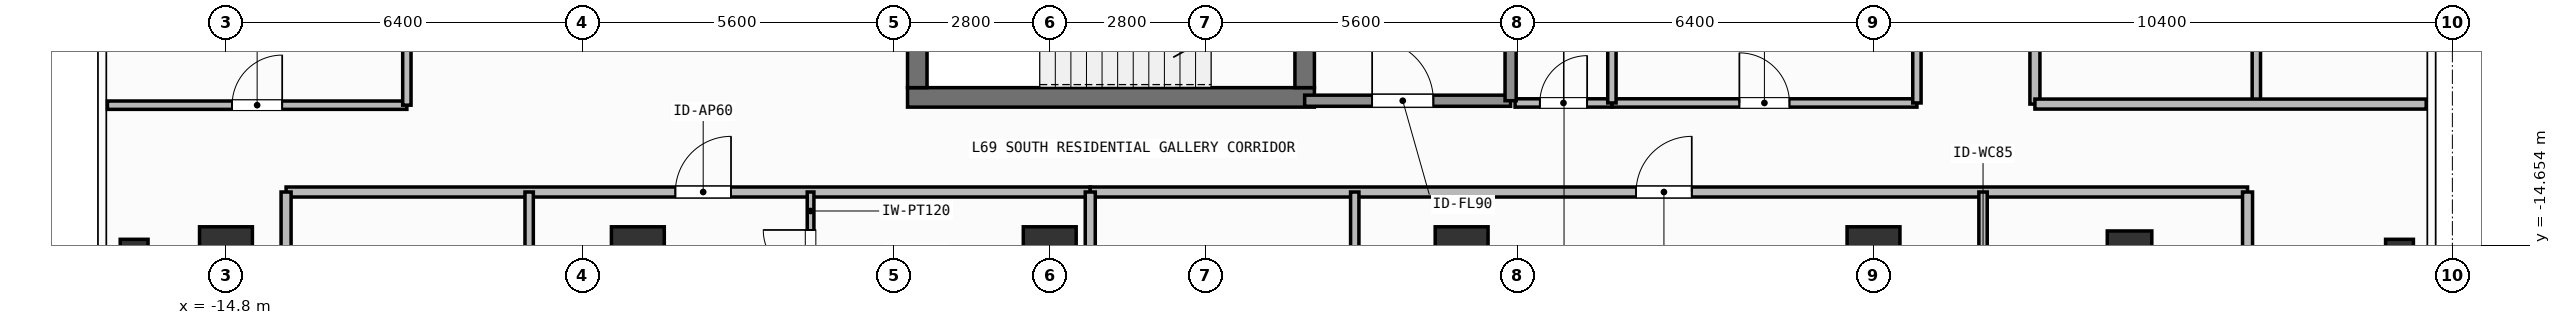
"""IFC4 building model, lengths in metres.
Left out: names, types, materials, properties, quantities, classifications, styles, units other than length and angle.
Written with IfcOpenShell. Run it as: python <this file> out.ifc"""

import sys

from ifc_helpers import new_model, si_unit, direction, frame, frame_2d, origin, origin_2d, place, context, subcontext, project, spatial, rectangle, hollow_rectangle, extrude, element, fill, save


model = new_model("IFC4")
c1 = context("Model", 3, precision=1e-05, world=origin(), true_north=direction((0.0, 1.0)))
c2 = subcontext(c1, "Body", "Model", "MODEL_VIEW")
j1 = project(units=[si_unit("LENGTHUNIT", "METRE"), si_unit("PLANEANGLEUNIT", "RADIAN")], contexts=[c1])
p1 = place(None, origin())
s1 = spatial("IfcSite", under=j1, at=p1, CompositionType="ELEMENT")
p2 = place(p1, origin())
s2 = spatial("IfcBuilding", under=s1, at=p2, CompositionType="ELEMENT")
p3 = place(p2, frame((0.0, 0.0, 282.0)))
s3 = spatial("IfcBuildingStorey", under=s2, at=p3, CompositionType="ELEMENT", Elevation=282.0)
p4 = place(p3, frame((-2.555, -12.0, 0.0), z_axis=(0.0, 0.0, 1.0), x_axis=(1.0, 0.0, 0.0)))
e1 = element("IfcWall", 1, at=p4, inside=s3, PredefinedType="SHEAR", context=c2, shape_type="SweptSolid", body=[
    extrude(rectangle(XDim=7.31, YDim=0.35, at=frame_2d((3.655, 0.0))), origin(), (0.0, 0.0, 1.0), 3.9),
])
p5 = place(p3, frame((-2.38, -11.825, 0.0), z_axis=(0.0, 0.0, 1.0), x_axis=(0.0, 1.0, 0.0)))
e2 = element("IfcWall", 2, at=p5, inside=s3, PredefinedType="SHEAR", context=c2, shape_type="SweptSolid", body=[
    extrude(rectangle(XDim=2.925, YDim=0.35, at=frame_2d((1.462, 0.0))), origin(), (0.0, 0.0, 1.0), 3.9),
])
p6 = place(p3, frame((4.58, -8.9, 0.0), z_axis=(0.0, 0.0, 1.0), x_axis=(0.0, -1.0, 0.0)))
e3 = element("IfcWall", 3, at=p6, inside=s3, PredefinedType="SHEAR", context=c2, shape_type="SweptSolid", body=[
    extrude(rectangle(XDim=2.925, YDim=0.35, at=frame_2d((1.462, 0.0))), origin(), (0.0, 0.0, 1.0), 3.9),
])
p7 = place(p6, frame((0.913, 0.0, 0.0)))
e4 = element("IfcOpeningElement", 4, at=p7, cuts=e3, PredefinedType="OPENING", context=c2, shape_type="SweptSolid", body=[
    extrude(rectangle(XDim=1.1, YDim=2.15, at=frame_2d((0.55, 1.075))), frame((0.0, 0.185, 0.0), z_axis=(0.0, -1.0, 0.0), x_axis=(1.0, 0.0, 0.0)), (0.0, 0.0, 1.0), 0.37),
])
for number, where, z_axis, x_axis in (
    (5, (-14.8, -14.8, 0.0), (0.0, 0.0, 1.0), (1.0, 0.0, 0.0)),
    (6, (-7.4, -14.8, 0.0), (0.0, 0.0, 1.0), (1.0, 0.0, 0.0)),
    (7, (0.0, -14.8, 0.0), (0.0, 0.0, 1.0), (1.0, 0.0, 0.0)),
    (8, (7.4, -14.8, 0.0), (0.0, 0.0, 1.0), (1.0, 0.0, 0.0)),
    (9, (14.8, -14.8, 0.0), (0.0, 0.0, 1.0), (1.0, 0.0, 0.0)),
):
    element("IfcColumn", number, at=place(p3, frame(where, z_axis=z_axis, x_axis=x_axis)), inside=s3, PredefinedType="COLUMN", context=c2, shape_type="SweptSolid", body=[
        extrude(rectangle(XDim=0.95, YDim=0.95, at=origin_2d()), origin(), (0.0, 0.0, 1.0), 3.9),
    ])
p8 = place(p3, frame((19.4, -14.8, 0.0), z_axis=(0.0, 0.0, 1.0), x_axis=(1.0, 0.0, 0.0)))
e10 = element("IfcColumn", 10, at=p8, inside=s3, PredefinedType="COLUMN", context=c2, shape_type="SweptSolid", body=[
    extrude(hollow_rectangle(XDim=0.8, YDim=0.8, WallThickness=0.036, at=origin_2d()), origin(), (0.0, 0.0, 1.0), 3.9),
])
for number, where, z_axis, x_axis in (
    (11, (-16.45, -14.8, 0.0), (0.0, 0.0, 1.0), (1.0, 0.0, 0.0)),
    (12, (24.25, -14.8, 0.0), (0.0, 0.0, 1.0), (1.0, 0.0, 0.0)),
):
    element("IfcColumn", number, at=place(p3, frame(where, z_axis=z_axis, x_axis=x_axis)), inside=s3, PredefinedType="COLUMN", context=c2, shape_type="SweptSolid", body=[
        extrude(hollow_rectangle(XDim=0.5, YDim=0.5, WallThickness=0.025, at=origin_2d()), origin(), (0.0, 0.0, 1.0), 3.9),
    ])
p9 = place(p3, frame((4.58, -12.06, 0.0), z_axis=(0.0, 0.0, 1.0), x_axis=(1.0, 0.0, 0.0)))
e13 = element("IfcWall", 13, at=p9, inside=s3, PredefinedType="SOLIDWALL", context=c2, shape_type="SweptSolid", body=[
    extrude(rectangle(XDim=3.7, YDim=0.2, at=frame_2d((1.85, 0.0))), origin(), (0.0, 0.0, 1.0), 3.62),
])
p10 = place(p9, frame((1.212, 0.0, 0.0)))
e14 = element("IfcOpeningElement", 14, at=p10, cuts=e13, PredefinedType="OPENING", context=c2, shape_type="SweptSolid", body=[
    extrude(rectangle(XDim=1.1, YDim=2.15, at=frame_2d((0.55, 1.075))), frame((0.0, 0.11, 0.0), z_axis=(0.0, -1.0, 0.0), x_axis=(1.0, 0.0, 0.0)), (0.0, 0.0, 1.0), 0.22),
])
p11 = place(p3, frame((8.36, -12.1, 0.0), z_axis=(0.0, 0.0, 1.0), x_axis=(1.0, 0.0, 0.0)))
e15 = element("IfcWall", 15, at=p11, inside=s3, PredefinedType="PARTITIONING", context=c2, shape_type="SweptSolid", body=[
    extrude(rectangle(XDim=1.74, YDim=0.15, at=frame_2d((0.87, 0.0))), origin(), (0.0, 0.0, 1.0), 3.62),
])
p12 = place(p11, frame((0.445, 0.0, 0.0)))
e16 = element("IfcOpeningElement", 16, at=p12, cuts=e15, PredefinedType="OPENING", context=c2, shape_type="SweptSolid", body=[
    extrude(rectangle(XDim=0.85, YDim=2.1, at=frame_2d((0.425, 1.05))), frame((0.0, 0.085, 0.0), z_axis=(0.0, -1.0, 0.0), x_axis=(1.0, 0.0, 0.0)), (0.0, 0.0, 1.0), 0.17),
])
p13 = place(p3, frame((10.1, -12.1, 0.0), z_axis=(0.0, 0.0, 1.0), x_axis=(1.0, 0.0, 0.0)))
e17 = element("IfcWall", 17, at=p13, inside=s3, PredefinedType="PARTITIONING", context=c2, shape_type="SweptSolid", body=[
    extrude(rectangle(XDim=5.48, YDim=0.15, at=frame_2d((2.74, 0.0))), origin(), (0.0, 0.0, 1.0), 3.62),
])
p14 = place(p13, frame((2.29, 0.0, 0.0)))
e18 = element("IfcOpeningElement", 18, at=p14, cuts=e17, PredefinedType="OPENING", context=c2, shape_type="SweptSolid", body=[
    extrude(rectangle(XDim=0.9, YDim=2.1, at=frame_2d((0.45, 1.05))), frame((0.0, 0.085, 0.0), z_axis=(0.0, -1.0, 0.0), x_axis=(1.0, 0.0, 0.0)), (0.0, 0.0, 1.0), 0.17),
])
p15 = place(p3, frame((-13.72, -13.7, 0.0), z_axis=(0.0, 0.0, 1.0), x_axis=(1.0, 0.0, 0.0)))
e19 = element("IfcWall", 19, at=p15, inside=s3, PredefinedType="PARTITIONING", context=c2, shape_type="SweptSolid", body=[
    extrude(rectangle(XDim=14.448, YDim=0.18, at=frame_2d((7.224, 0.0))), origin(), (0.0, 0.0, 1.0), 3.62),
])
p16 = place(p15, frame((6.994, 0.0, 0.0)))
e20 = element("IfcOpeningElement", 20, at=p16, cuts=e19, PredefinedType="OPENING", context=c2, shape_type="SweptSolid", body=[
    extrude(rectangle(XDim=1.0, YDim=2.2, at=frame_2d((0.5, 1.1))), frame((0.0, 0.1, 0.0), z_axis=(0.0, -1.0, 0.0), x_axis=(1.0, 0.0, 0.0)), (0.0, 0.0, 1.0), 0.2),
])
p17 = place(p3, frame((-9.353, -17.343, 0.0), z_axis=(0.0, 0.0, 1.0), x_axis=(0.0, 1.0, 0.0)))
e21 = element("IfcWall", 21, at=p17, inside=s3, PredefinedType="PARTITIONING", context=c2, shape_type="SweptSolid", body=[
    extrude(rectangle(XDim=3.643, YDim=0.15, at=frame_2d((1.822, 0.0))), origin(), (0.0, 0.0, 1.0), 3.62),
])
p18 = place(p17, frame((1.396, 0.0, 0.0)))
e22 = element("IfcOpeningElement", 22, at=p18, cuts=e21, PredefinedType="OPENING", context=c2, shape_type="SweptSolid", body=[
    extrude(rectangle(XDim=0.85, YDim=2.1, at=frame_2d((0.425, 1.05))), frame((0.0, 0.085, 0.0), z_axis=(0.0, -1.0, 0.0), x_axis=(1.0, 0.0, 0.0)), (0.0, 0.0, 1.0), 0.17),
])
p19 = place(p3, frame((-4.297, -15.74, 0.0), z_axis=(0.0, 0.0, 1.0), x_axis=(0.0, 1.0, 0.0)))
e23 = element("IfcWall", 23, at=p19, inside=s3, PredefinedType="PARTITIONING", context=c2, shape_type="SweptSolid", body=[
    extrude(rectangle(XDim=2.04, YDim=0.12, at=frame_2d((1.02, 0.0))), origin(), (0.0, 0.0, 1.0), 3.62),
])
p20 = place(p19, frame((0.508, 0.0, 0.0)))
e24 = element("IfcOpeningElement", 24, at=p20, cuts=e23, PredefinedType="OPENING", context=c2, shape_type="SweptSolid", body=[
    extrude(rectangle(XDim=0.85, YDim=2.1, at=frame_2d((0.425, 1.05))), frame((0.0, 0.07, 0.0), z_axis=(0.0, -1.0, 0.0), x_axis=(1.0, 0.0, 0.0)), (0.0, 0.0, 1.0), 0.14),
])
p21 = place(p3, frame((0.728, -13.7, 0.0), z_axis=(0.0, 0.0, 1.0), x_axis=(1.0, 0.0, 0.0)))
e25 = element("IfcWall", 25, at=p21, inside=s3, PredefinedType="PARTITIONING", context=c2, shape_type="SweptSolid", body=[
    extrude(rectangle(XDim=20.792, YDim=0.18, at=frame_2d((10.396, 0.0))), origin(), (0.0, 0.0, 1.0), 3.62),
])
p22 = place(p21, frame((9.807, 0.0, 0.0)))
e26 = element("IfcOpeningElement", 26, at=p22, cuts=e25, PredefinedType="OPENING", context=c2, shape_type="SweptSolid", body=[
    extrude(rectangle(XDim=1.0, YDim=2.2, at=frame_2d((0.5, 1.1))), frame((0.0, 0.1, 0.0), z_axis=(0.0, -1.0, 0.0), x_axis=(1.0, 0.0, 0.0)), (0.0, 0.0, 1.0), 0.2),
])
p23 = place(p3, frame((5.48, -17.045, 0.0), z_axis=(0.0, 0.0, 1.0), x_axis=(0.0, 1.0, 0.0)))
e27 = element("IfcWall", 27, at=p23, inside=s3, PredefinedType="PARTITIONING", context=c2, shape_type="SweptSolid", body=[
    extrude(rectangle(XDim=3.345, YDim=0.15, at=frame_2d((1.672, 0.0))), origin(), (0.0, 0.0, 1.0), 3.62),
])
p24 = place(p23, frame((1.164, 0.0, 0.0)))
e28 = element("IfcOpeningElement", 28, at=p24, cuts=e27, PredefinedType="OPENING", context=c2, shape_type="SweptSolid", body=[
    extrude(rectangle(XDim=0.85, YDim=2.1, at=frame_2d((0.425, 1.05))), frame((0.0, 0.085, 0.0), z_axis=(0.0, -1.0, 0.0), x_axis=(1.0, 0.0, 0.0)), (0.0, 0.0, 1.0), 0.17),
])
p25 = place(p3, frame((16.768, -17.045, 0.0), z_axis=(0.0, 0.0, 1.0), x_axis=(0.0, 1.0, 0.0)))
e29 = element("IfcWall", 29, at=p25, inside=s3, PredefinedType="PARTITIONING", context=c2, shape_type="SweptSolid", body=[
    extrude(rectangle(XDim=3.345, YDim=0.15, at=frame_2d((1.672, 0.0))), origin(), (0.0, 0.0, 1.0), 3.62),
])
p26 = place(p25, frame((1.164, 0.0, 0.0)))
e30 = element("IfcOpeningElement", 30, at=p26, cuts=e29, PredefinedType="OPENING", context=c2, shape_type="SweptSolid", body=[
    extrude(rectangle(XDim=0.85, YDim=2.1, at=frame_2d((0.425, 1.05))), frame((0.0, 0.085, 0.0), z_axis=(0.0, -1.0, 0.0), x_axis=(1.0, 0.0, 0.0)), (0.0, 0.0, 1.0), 0.17),
])
p27 = place(p3, frame((-16.93, -12.14, 0.0), z_axis=(0.0, 0.0, 1.0), x_axis=(1.0, 0.0, 0.0)))
e31 = element("IfcWall", 31, at=p27, inside=s3, PredefinedType="PARTITIONING", context=c2, shape_type="SweptSolid", body=[
    extrude(rectangle(XDim=5.38, YDim=0.15, at=frame_2d((2.69, 0.0))), origin(), (0.0, 0.0, 1.0), 3.62),
])
p28 = place(p27, frame((2.24, 0.0, 0.0)))
e32 = element("IfcOpeningElement", 32, at=p28, cuts=e31, PredefinedType="OPENING", context=c2, shape_type="SweptSolid", body=[
    extrude(rectangle(XDim=0.9, YDim=2.1, at=frame_2d((0.45, 1.05))), frame((0.0, 0.085, 0.0), z_axis=(0.0, -1.0, 0.0), x_axis=(1.0, 0.0, 0.0)), (0.0, 0.0, 1.0), 0.17),
])
p29 = place(p3, frame((17.7, -12.12, 0.0), z_axis=(0.0, 0.0, 1.0), x_axis=(0.0, 1.0, 0.0)))
e33 = element("IfcWall", 33, at=p29, inside=s3, PredefinedType="PARTITIONING", context=c2, shape_type="SweptSolid", body=[
    extrude(rectangle(XDim=24.24, YDim=0.18, at=frame_2d((12.12, 0.0))), origin(), (0.0, 0.0, 1.0), 3.62),
])
p30 = place(p29, frame((11.62, 0.0, 0.0)))
e34 = element("IfcOpeningElement", 34, at=p30, cuts=e33, PredefinedType="OPENING", context=c2, shape_type="SweptSolid", body=[
    extrude(rectangle(XDim=1.0, YDim=2.2, at=frame_2d((0.5, 1.1))), frame((0.0, 0.1, 0.0), z_axis=(0.0, -1.0, 0.0), x_axis=(1.0, 0.0, 0.0)), (0.0, 0.0, 1.0), 0.2),
])
p31 = place(p3, frame((8.28, -12.06, 0.0), z_axis=(0.0, 0.0, 1.0), x_axis=(0.0, 1.0, 0.0)))
e35 = element("IfcWall", 35, at=p31, inside=s3, PredefinedType="SOLIDWALL", context=c2, shape_type="SweptSolid", body=[
    extrude(rectangle(XDim=3.335, YDim=0.2, at=frame_2d((1.667, 0.0))), origin(), (0.0, 0.0, 1.0), 3.62),
])
p32 = place(p3, frame((10.1, -12.1, 0.0), z_axis=(0.0, 0.0, 1.0), x_axis=(0.0, 1.0, 0.0)))
e36 = element("IfcWall", 36, at=p32, inside=s3, PredefinedType="PARTITIONING", context=c2, shape_type="SweptSolid", body=[
    extrude(rectangle(XDim=2.35, YDim=0.15, at=frame_2d((1.175, 0.0))), origin(), (0.0, 0.0, 1.0), 3.62),
])
p33 = place(p3, frame((15.58, -12.1, 0.0), z_axis=(0.0, 0.0, 1.0), x_axis=(0.0, 1.0, 0.0)))
e37 = element("IfcWall", 37, at=p33, inside=s3, PredefinedType="PARTITIONING", context=c2, shape_type="SweptSolid", body=[
    extrude(rectangle(XDim=6.25, YDim=0.15, at=frame_2d((3.125, 0.0))), origin(), (0.0, 0.0, 1.0), 3.62),
])
for number, where, z_axis, x_axis in (
    (38, (-13.72, -19.51, 0.0), (0.0, 0.0, 1.0), (0.0, 1.0, 0.0)),
    (39, (21.52, -19.51, 0.0), (0.0, 0.0, 1.0), (0.0, 1.0, 0.0)),
):
    element("IfcWall", number, at=place(p3, frame(where, z_axis=z_axis, x_axis=x_axis)), inside=s3, PredefinedType="PARTITIONING", context=c2, shape_type="SweptSolid", body=[
        extrude(rectangle(XDim=5.81, YDim=0.18, at=frame_2d((2.905, 0.0))), origin(), (0.0, 0.0, 1.0), 3.62),
    ])
p34 = place(p3, frame((0.728, -20.63, 0.0), z_axis=(0.0, 0.0, 1.0), x_axis=(0.0, 1.0, 0.0)))
e40 = element("IfcWall", 40, at=p34, inside=s3, PredefinedType="PARTITIONING", context=c2, shape_type="SweptSolid", body=[
    extrude(rectangle(XDim=6.93, YDim=0.18, at=frame_2d((3.465, 0.0))), origin(), (0.0, 0.0, 1.0), 3.62),
])
p35 = place(p3, frame((-11.55, -12.14, 0.0), z_axis=(0.0, 0.0, 1.0), x_axis=(0.0, 1.0, 0.0)))
e41 = element("IfcWall", 41, at=p35, inside=s3, PredefinedType="PARTITIONING", context=c2, shape_type="SweptSolid", body=[
    extrude(rectangle(XDim=13.94, YDim=0.15, at=frame_2d((6.97, 0.0))), origin(), (0.0, 0.0, 1.0), 3.62),
])
p36 = place(p3, frame((21.678, -12.12, 0.0), z_axis=(0.0, 0.0, 1.0), x_axis=(0.0, 1.0, 0.0)))
e42 = element("IfcWall", 42, at=p36, inside=s3, PredefinedType="PARTITIONING", context=c2, shape_type="SweptSolid", body=[
    extrude(rectangle(XDim=6.689, YDim=0.15, at=frame_2d((3.345, 0.0))), origin(), (0.0, 0.0, 1.0), 3.62),
])
p37 = place(p3, frame((17.7, -12.12, 0.0), z_axis=(0.0, 0.0, 1.0), x_axis=(1.0, 0.0, 0.0)))
e43 = element("IfcWall", 43, at=p37, inside=s3, PredefinedType="PARTITIONING", context=c2, shape_type="SweptSolid", body=[
    extrude(rectangle(XDim=7.03, YDim=0.18, at=frame_2d((3.515, 0.0))), origin(), (0.0, 0.0, 1.0), 3.62),
])
p38 = place(p10, origin())
e44 = element("IfcDoor", 44, at=p38, inside=s3, OperationType="SINGLE_SWING_LEFT", PredefinedType="DOOR", context=c2, shape_type="SweptSolid", body=[
    extrude(rectangle(XDim=1.1, YDim=2.15, at=frame_2d((0.55, 1.075))), frame((0.0, 0.025, 0.0), z_axis=(0.0, -1.0, 0.0), x_axis=(1.0, 0.0, 0.0)), (0.0, 0.0, 1.0), 0.05),
])
fill(e14, e44)
p39 = place(p12, origin())
e45 = element("IfcDoor", 45, at=p39, inside=s3, OperationType="SINGLE_SWING_RIGHT", PredefinedType="DOOR", context=c2, shape_type="SweptSolid", body=[
    extrude(rectangle(XDim=0.85, YDim=2.1, at=frame_2d((0.425, 1.05))), frame((0.0, 0.025, 0.0), z_axis=(0.0, -1.0, 0.0), x_axis=(1.0, 0.0, 0.0)), (0.0, 0.0, 1.0), 0.05),
])
fill(e16, e45)
p40 = place(p14, origin())
e46 = element("IfcDoor", 46, at=p40, inside=s3, OperationType="SINGLE_SWING_LEFT", PredefinedType="DOOR", context=c2, shape_type="SweptSolid", body=[
    extrude(rectangle(XDim=0.9, YDim=2.1, at=frame_2d((0.45, 1.05))), frame((0.0, 0.025, 0.0), z_axis=(0.0, -1.0, 0.0), x_axis=(1.0, 0.0, 0.0)), (0.0, 0.0, 1.0), 0.05),
])
fill(e18, e46)
p41 = place(p16, origin())
e47 = element("IfcDoor", 47, at=p41, inside=s3, OperationType="SINGLE_SWING_RIGHT", PredefinedType="DOOR", context=c2, shape_type="SweptSolid", body=[
    extrude(rectangle(XDim=1.0, YDim=2.2, at=frame_2d((0.5, 1.1))), frame((0.0, 0.025, 0.0), z_axis=(0.0, -1.0, 0.0), x_axis=(1.0, 0.0, 0.0)), (0.0, 0.0, 1.0), 0.05),
])
fill(e20, e47)
p42 = place(p20, origin())
e48 = element("IfcDoor", 48, at=p42, inside=s3, OperationType="SINGLE_SWING_RIGHT", PredefinedType="DOOR", context=c2, shape_type="SweptSolid", body=[
    extrude(rectangle(XDim=0.85, YDim=2.1, at=frame_2d((0.425, 1.05))), frame((0.0, 0.025, 0.0), z_axis=(0.0, -1.0, 0.0), x_axis=(1.0, 0.0, 0.0)), (0.0, 0.0, 1.0), 0.05),
])
fill(e24, e48)
p43 = place(p22, origin())
e49 = element("IfcDoor", 49, at=p43, inside=s3, OperationType="SINGLE_SWING_RIGHT", PredefinedType="DOOR", context=c2, shape_type="SweptSolid", body=[
    extrude(rectangle(XDim=1.0, YDim=2.2, at=frame_2d((0.5, 1.1))), frame((0.0, 0.025, 0.0), z_axis=(0.0, -1.0, 0.0), x_axis=(1.0, 0.0, 0.0)), (0.0, 0.0, 1.0), 0.05),
])
fill(e26, e49)
p44 = place(p28, origin())
e50 = element("IfcDoor", 50, at=p44, inside=s3, OperationType="SINGLE_SWING_RIGHT", PredefinedType="DOOR", context=c2, shape_type="SweptSolid", body=[
    extrude(rectangle(XDim=0.9, YDim=2.1, at=frame_2d((0.45, 1.05))), frame((0.0, 0.025, 0.0), z_axis=(0.0, -1.0, 0.0), x_axis=(1.0, 0.0, 0.0)), (0.0, 0.0, 1.0), 0.05),
])
fill(e32, e50)
save(model, sys.argv[1])
